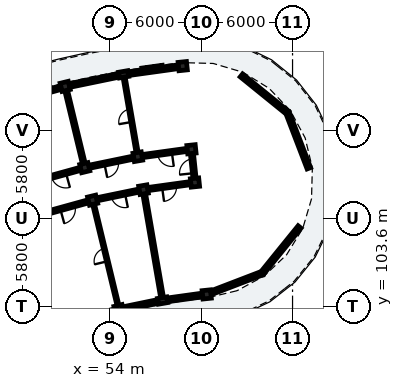
"""IFC4 building model, lengths in metres.
Left out: names, types, materials, properties, quantities, classifications, styles, units other than length and angle.
Written with IfcOpenShell. Run it as: python <this file> out.ifc"""

import sys

from ifc_helpers import new_model, si_unit, direction, frame, frame_2d, origin, origin_2d, place, context, subcontext, project, spatial, rectangle, extrude, element, fill, save


model = new_model("IFC4")
c1 = context("Model", 3, precision=1e-05, world=origin(), true_north=direction((0.0, 1.0)))
c2 = subcontext(c1, "Body", "Model", "MODEL_VIEW")
j1 = project(units=[si_unit("LENGTHUNIT", "METRE"), si_unit("PLANEANGLEUNIT", "RADIAN")], contexts=[c1])
p1 = place(None, origin())
s1 = spatial("IfcSite", under=j1, at=p1, CompositionType="ELEMENT")
p2 = place(p1, origin())
s2 = spatial("IfcBuilding", under=s1, at=p2, CompositionType="ELEMENT")
p3 = place(p2, frame((0.0, 0.0, 22.28)))
s3 = spatial("IfcBuildingStorey", under=s2, at=p3, CompositionType="ELEMENT", Elevation=22.28)
for number, where, z_axis, x_axis in (
    (1, (60.354, 104.406, 0.0), (0.0, 0.0, 1.0), (-0.105, 0.995, 0.0)),
    (2, (59.58, 111.766, 0.0), (0.0, 0.0, 1.0), (-0.105, 0.995, 0.0)),
    (3, (59.35, 113.954, 0.0), (0.0, 0.0, 1.0), (-0.105, 0.995, 0.0)),
    (4, (58.775, 119.424, 0.0), (0.0, 0.0, 1.0), (-0.105, 0.995, 0.0)),
):
    element("IfcColumn", number, at=place(p3, frame(where, z_axis=z_axis, x_axis=x_axis)), inside=s3, PredefinedType="COLUMN", context=c2, shape_type="SweptSolid", body=[
        extrude(rectangle(XDim=0.55, YDim=0.55, at=origin_2d()), origin(), (0.0, 0.0, 1.0), 3.11),
    ])
p4 = place(p3, frame((57.451, 104.004, 0.0), z_axis=(0.0, 0.0, 1.0), x_axis=(-0.169827298811, 0.985473839622, 0.0)))
e5 = element("IfcColumn", 5, at=p4, inside=s3, PredefinedType="PILASTER", context=c2, shape_type="SweptSolid", body=[
    extrude(rectangle(XDim=0.38, YDim=0.62, at=origin_2d()), origin(), (0.0, 0.0, 1.0), 3.11),
])
for number, where, z_axis, x_axis in (
    (6, (56.194, 111.297, 0.0), (0.0, 0.0, 1.0), (-0.17, 0.985, 0.0)),
    (7, (55.821, 113.465, 0.0), (0.0, 0.0, 1.0), (-0.17, 0.985, 0.0)),
):
    element("IfcColumn", number, at=place(p3, frame(where, z_axis=z_axis, x_axis=x_axis)), inside=s3, PredefinedType="COLUMN", context=c2, shape_type="SweptSolid", body=[
        extrude(rectangle(XDim=0.55, YDim=0.55, at=origin_2d()), origin(), (0.0, 0.0, 1.0), 3.11),
    ])
p5 = place(p3, frame((54.887, 118.885, 0.0), z_axis=(0.0, 0.0, 1.0), x_axis=(-0.169827298811, 0.985473839622, 0.0)))
e8 = element("IfcColumn", 8, at=p5, inside=s3, PredefinedType="PILASTER", context=c2, shape_type="SweptSolid", body=[
    extrude(rectangle(XDim=0.38, YDim=0.62, at=origin_2d()), origin(), (0.0, 0.0, 1.0), 3.11),
])
for number, where, z_axis, x_axis in (
    (9, (54.582, 103.412, 0.0), (0.0, 0.0, 1.0), (-0.234, 0.972, 0.0)),
    (10, (52.847, 110.606, 0.0), (0.0, 0.0, 1.0), (-0.234, 0.972, 0.0)),
    (11, (52.331, 112.744, 0.0), (0.0, 0.0, 1.0), (-0.234, 0.972, 0.0)),
    (12, (51.042, 118.091, 0.0), (0.0, 0.0, 1.0), (-0.234, 0.972, 0.0)),
):
    element("IfcColumn", number, at=place(p3, frame(where, z_axis=z_axis, x_axis=x_axis)), inside=s3, PredefinedType="COLUMN", context=c2, shape_type="SweptSolid", body=[
        extrude(rectangle(XDim=0.55, YDim=0.55, at=origin_2d()), origin(), (0.0, 0.0, 1.0), 3.11),
    ])
p6 = place(p3, frame((58.533, 119.39, 0.0), z_axis=(0.0, 0.0, 1.0), x_axis=(-0.990539718913, -0.137226328578, 0.0)))
e13 = element("IfcWall", 13, at=p6, inside=s3, PredefinedType="SOLIDWALL", context=c2, shape_type="SweptSolid", body=[
    extrude(rectangle(XDim=3.521, YDim=0.245, at=frame_2d((1.76, 0.0))), origin(), (0.0, 0.0, 1.0), 2.355),
])
p7 = place(p6, frame((1.035, 0.0, 0.35)))
e14 = element("IfcOpeningElement", 14, at=p7, cuts=e13, PredefinedType="OPENING", context=c2, shape_type="SweptSolid", body=[
    extrude(rectangle(XDim=1.45, YDim=1.7, at=frame_2d((0.725, 0.85))), frame((0.0, 0.133, 0.0), z_axis=(0.0, -1.0, 0.0), x_axis=(1.0, 0.0, 0.0)), (0.0, 0.0, 1.0), 0.265),
])
p8 = place(p3, frame((60.111, 104.373, 0.0), z_axis=(0.0, 0.0, 1.0), x_axis=(-0.990545622952, -0.13718370476, 0.0)))
e15 = element("IfcWall", 15, at=p8, inside=s3, PredefinedType="SOLIDWALL", context=c2, shape_type="SweptSolid", body=[
    extrude(rectangle(XDim=2.525, YDim=0.245, at=frame_2d((1.263, 0.0))), origin(), (0.0, 0.0, 1.0), 2.355),
])
p9 = place(p8, frame((0.363, 0.0, 0.35)))
e16 = element("IfcOpeningElement", 16, at=p9, cuts=e15, PredefinedType="OPENING", context=c2, shape_type="SweptSolid", body=[
    extrude(rectangle(XDim=1.8, YDim=1.85, at=frame_2d((0.9, 0.925))), frame((0.0, 0.133, 0.0), z_axis=(0.0, -1.0, 0.0), x_axis=(1.0, 0.0, 0.0)), (0.0, 0.0, 1.0), 0.265),
])
p10 = place(p3, frame((54.73, 118.853, 0.0), z_axis=(0.0, 0.0, 1.0), x_axis=(-0.979340051053, -0.202220336275, 0.0)))
e17 = element("IfcWall", 17, at=p10, inside=s3, PredefinedType="SOLIDWALL", context=c2, shape_type="SweptSolid", body=[
    extrude(rectangle(XDim=3.521, YDim=0.245, at=frame_2d((1.76, 0.0))), origin(), (0.0, 0.0, 1.0), 2.355),
])
p11 = place(p10, frame((0.96, 0.0, 0.35)))
e18 = element("IfcOpeningElement", 18, at=p11, cuts=e17, PredefinedType="OPENING", context=c2, shape_type="SweptSolid", body=[
    extrude(rectangle(XDim=1.6, YDim=1.75, at=frame_2d((0.8, 0.875))), frame((0.0, 0.133, 0.0), z_axis=(0.0, -1.0, 0.0), x_axis=(1.0, 0.0, 0.0)), (0.0, 0.0, 1.0), 0.265),
])
p12 = place(p3, frame((57.294, 103.972, 0.0), z_axis=(0.0, 0.0, 1.0), x_axis=(-0.979334432394, -0.20224754517, 0.0)))
e19 = element("IfcWall", 19, at=p12, inside=s3, PredefinedType="SOLIDWALL", context=c2, shape_type="SweptSolid", body=[
    extrude(rectangle(XDim=2.525, YDim=0.245, at=frame_2d((1.263, 0.0))), origin(), (0.0, 0.0, 1.0), 2.355),
])
p13 = place(p12, frame((0.623, 0.0, 0.55)))
e20 = element("IfcOpeningElement", 20, at=p13, cuts=e19, PredefinedType="OPENING", context=c2, shape_type="SweptSolid", body=[
    extrude(rectangle(XDim=1.28, YDim=1.52, at=frame_2d((0.64, 0.76))), frame((0.0, 0.133, 0.0), z_axis=(0.0, -1.0, 0.0), x_axis=(1.0, 0.0, 0.0)), (0.0, 0.0, 1.0), 0.265),
])
p14 = place(p3, frame((50.806, 118.026, 0.0), z_axis=(0.0, 0.0, 1.0), x_axis=(-0.963899390209, -0.266266718826, 0.0)))
e21 = element("IfcWall", 21, at=p14, inside=s3, PredefinedType="SOLIDWALL", context=c2, shape_type="SweptSolid", body=[
    extrude(rectangle(XDim=3.521, YDim=0.245, at=frame_2d((1.76, 0.0))), origin(), (0.0, 0.0, 1.0), 2.355),
])
p15 = place(p14, frame((1.22, 0.0, 0.0)))
e22 = element("IfcOpeningElement", 22, at=p15, cuts=e21, PredefinedType="OPENING", context=c2, shape_type="SweptSolid", body=[
    extrude(rectangle(XDim=1.08, YDim=2.15, at=frame_2d((0.54, 1.075))), frame((0.0, 0.133, 0.0), z_axis=(0.0, -1.0, 0.0), x_axis=(1.0, 0.0, 0.0)), (0.0, 0.0, 1.0), 0.265),
])
p16 = place(p3, frame((62.635, 118.812, 0.0), z_axis=(0.0, 0.0, 1.0), x_axis=(0.777137204109, -0.629331205321, 0.0)))
e23 = element("IfcWall", 23, at=p16, inside=s3, PredefinedType="SOLIDWALL", context=c2, shape_type="SweptSolid", body=[
    extrude(rectangle(XDim=3.908, YDim=0.245, at=frame_2d((1.954, 0.0))), origin(), (0.0, 0.0, 1.0), 2.355),
])
p17 = place(p16, frame((0.979, 0.0, 0.4)))
e24 = element("IfcOpeningElement", 24, at=p17, cuts=e23, PredefinedType="OPENING", context=c2, shape_type="SweptSolid", body=[
    extrude(rectangle(XDim=1.95, YDim=1.78, at=frame_2d((0.975, 0.89))), frame((0.0, 0.133, 0.0), z_axis=(0.0, -1.0, 0.0), x_axis=(1.0, 0.0, 0.0)), (0.0, 0.0, 1.0), 0.265),
])
p18 = place(p3, frame((65.673, 116.353, 0.0), z_axis=(0.0, 0.0, 1.0), x_axis=(0.358376224971, -0.933577249817, 0.0)))
e25 = element("IfcWall", 25, at=p18, inside=s3, PredefinedType="SOLIDWALL", context=c2, shape_type="SweptSolid", body=[
    extrude(rectangle(XDim=3.908, YDim=0.245, at=frame_2d((1.954, 0.0))), origin(), (0.0, 0.0, 1.0), 2.355),
])
p19 = place(p3, frame((66.462, 108.844, 0.0), z_axis=(0.0, 0.0, 1.0), x_axis=(-0.629331205321, -0.777137204109, 0.0)))
e26 = element("IfcWall", 26, at=p19, inside=s3, PredefinedType="SOLIDWALL", context=c2, shape_type="SweptSolid", body=[
    extrude(rectangle(XDim=3.908, YDim=0.245, at=frame_2d((1.954, 0.0))), origin(), (0.0, 0.0, 1.0), 2.355),
])
p20 = place(p19, frame((0.979, 0.0, 0.4)))
e27 = element("IfcOpeningElement", 27, at=p20, cuts=e26, PredefinedType="OPENING", context=c2, shape_type="SweptSolid", body=[
    extrude(rectangle(XDim=1.95, YDim=1.78, at=frame_2d((0.975, 0.89))), frame((0.0, 0.133, 0.0), z_axis=(0.0, -1.0, 0.0), x_axis=(1.0, 0.0, 0.0)), (0.0, 0.0, 1.0), 0.265),
])
p21 = place(p3, frame((64.002, 105.807, 0.0), z_axis=(0.0, 0.0, 1.0), x_axis=(-0.93356922619, -0.35839712598, 0.0)))
e28 = element("IfcWall", 28, at=p21, inside=s3, PredefinedType="SOLIDWALL", context=c2, shape_type="SweptSolid", body=[
    extrude(rectangle(XDim=3.908, YDim=0.245, at=frame_2d((1.954, 0.0))), origin(), (0.0, 0.0, 1.0), 2.355),
])
p22 = place(p3, frame((59.004, 113.906, 0.0), z_axis=(0.0, 0.0, 1.0), x_axis=(-0.990544162976, -0.137194246211, 0.0)))
e29 = element("IfcWall", 29, at=p22, inside=s3, PredefinedType="PARTITIONING", context=c2, shape_type="SweptSolid", body=[
    extrude(rectangle(XDim=2.863, YDim=0.205, at=frame_2d((1.432, 0.0))), origin(), (0.0, 0.0, 1.0), 2.37),
])
p23 = place(p22, frame((0.957, 0.0, 0.0)))
e30 = element("IfcOpeningElement", 30, at=p23, cuts=e29, PredefinedType="OPENING", context=c2, shape_type="SweptSolid", body=[
    extrude(rectangle(XDim=0.95, YDim=2.13, at=frame_2d((0.475, 1.065))), frame((0.0, 0.113, 0.0), z_axis=(0.0, -1.0, 0.0), x_axis=(1.0, 0.0, 0.0)), (0.0, 0.0, 1.0), 0.225),
])
p24 = place(p3, frame((59.233, 111.718, 0.0), z_axis=(0.0, 0.0, 1.0), x_axis=(-0.990535404475, -0.137257467855, 0.0)))
e31 = element("IfcWall", 31, at=p24, inside=s3, PredefinedType="PARTITIONING", context=c2, shape_type="SweptSolid", body=[
    extrude(rectangle(XDim=2.718, YDim=0.205, at=frame_2d((1.359, 0.0))), origin(), (0.0, 0.0, 1.0), 2.37),
])
p25 = place(p24, frame((0.884, 0.0, 0.0)))
e32 = element("IfcOpeningElement", 32, at=p25, cuts=e31, PredefinedType="OPENING", context=c2, shape_type="SweptSolid", body=[
    extrude(rectangle(XDim=0.95, YDim=2.13, at=frame_2d((0.475, 1.065))), frame((0.0, 0.113, 0.0), z_axis=(0.0, -1.0, 0.0), x_axis=(1.0, 0.0, 0.0)), (0.0, 0.0, 1.0), 0.225),
])
p26 = place(p3, frame((55.753, 113.859, 0.0), z_axis=(0.0, 0.0, 1.0), x_axis=(-0.169812980219, 0.985476307046, 0.0)))
e33 = element("IfcWall", 33, at=p26, inside=s3, PredefinedType="PLUMBINGWALL", context=c2, shape_type="SweptSolid", body=[
    extrude(rectangle(XDim=4.7, YDim=0.14, at=frame_2d((2.35, 0.0))), origin(), (0.0, 0.0, 1.0), 2.37),
])
p27 = place(p26, frame((1.92, 0.0, 0.0)))
e34 = element("IfcOpeningElement", 34, at=p27, cuts=e33, PredefinedType="OPENING", context=c2, shape_type="SweptSolid", body=[
    extrude(rectangle(XDim=0.86, YDim=2.06, at=frame_2d((0.43, 1.03))), frame((0.0, 0.08, 0.0), z_axis=(0.0, -1.0, 0.0), x_axis=(1.0, 0.0, 0.0)), (0.0, 0.0, 1.0), 0.16),
])
p28 = place(p3, frame((57.383, 104.398, 0.0), z_axis=(0.0, 0.0, 1.0), x_axis=(-0.169825160084, 0.985474208187, 0.0)))
e35 = element("IfcWall", 35, at=p28, inside=s3, PredefinedType="PARTITIONING", context=c2, shape_type="SweptSolid", body=[
    extrude(rectangle(XDim=6.6, YDim=0.185, at=frame_2d((3.3, 0.0))), origin(), (0.0, 0.0, 1.0), 2.37),
])
p29 = place(p3, frame((55.478, 113.394, 0.0), z_axis=(0.0, 0.0, 1.0), x_axis=(-0.979348418612, -0.202179808492, 0.0)))
e36 = element("IfcWall", 36, at=p29, inside=s3, PredefinedType="PARTITIONING", context=c2, shape_type="SweptSolid", body=[
    extrude(rectangle(XDim=2.863, YDim=0.205, at=frame_2d((1.432, 0.0))), origin(), (0.0, 0.0, 1.0), 2.37),
])
p30 = place(p29, frame((0.967, 0.0, 0.0)))
e37 = element("IfcOpeningElement", 37, at=p30, cuts=e36, PredefinedType="OPENING", context=c2, shape_type="SweptSolid", body=[
    extrude(rectangle(XDim=0.93, YDim=2.12, at=frame_2d((0.465, 1.06))), frame((0.0, 0.113, 0.0), z_axis=(0.0, -1.0, 0.0), x_axis=(1.0, 0.0, 0.0)), (0.0, 0.0, 1.0), 0.225),
])
p31 = place(p3, frame((55.852, 111.226, 0.0), z_axis=(0.0, 0.0, 1.0), x_axis=(-0.979349423541, -0.202174940608, 0.0)))
e38 = element("IfcWall", 38, at=p31, inside=s3, PredefinedType="PARTITIONING", context=c2, shape_type="SweptSolid", body=[
    extrude(rectangle(XDim=2.718, YDim=0.205, at=frame_2d((1.359, 0.0))), origin(), (0.0, 0.0, 1.0), 2.37),
])
p32 = place(p31, frame((0.894, 0.0, 0.0)))
e39 = element("IfcOpeningElement", 39, at=p32, cuts=e38, PredefinedType="OPENING", context=c2, shape_type="SweptSolid", body=[
    extrude(rectangle(XDim=0.93, YDim=2.12, at=frame_2d((0.465, 1.06))), frame((0.0, 0.113, 0.0), z_axis=(0.0, -1.0, 0.0), x_axis=(1.0, 0.0, 0.0)), (0.0, 0.0, 1.0), 0.225),
])
p33 = place(p3, frame((52.238, 113.133, 0.0), z_axis=(0.0, 0.0, 1.0), x_axis=(-0.234386624934, 0.972143461662, 0.0)))
e40 = element("IfcWall", 40, at=p33, inside=s3, PredefinedType="PARTITIONING", context=c2, shape_type="SweptSolid", body=[
    extrude(rectangle(XDim=4.7, YDim=0.185, at=frame_2d((2.35, 0.0))), origin(), (0.0, 0.0, 1.0), 2.37),
])
p34 = place(p3, frame((54.488, 103.801, 0.0), z_axis=(0.0, 0.0, 1.0), x_axis=(-0.234406698576, 0.972138621629, 0.0)))
e41 = element("IfcWall", 41, at=p34, inside=s3, PredefinedType="PARTITIONING", context=c2, shape_type="SweptSolid", body=[
    extrude(rectangle(XDim=6.6, YDim=0.125, at=frame_2d((3.3, 0.0))), origin(), (0.0, 0.0, 1.0), 2.37),
])
p35 = place(p34, frame((2.865, 0.0, 0.0)))
e42 = element("IfcOpeningElement", 42, at=p35, cuts=e41, PredefinedType="OPENING", context=c2, shape_type="SweptSolid", body=[
    extrude(rectangle(XDim=0.87, YDim=2.08, at=frame_2d((0.435, 1.04))), frame((0.0, 0.073, 0.0), z_axis=(0.0, -1.0, 0.0), x_axis=(1.0, 0.0, 0.0)), (0.0, 0.0, 1.0), 0.145),
])
p36 = place(p3, frame((51.994, 112.651, 0.0), z_axis=(0.0, 0.0, 1.0), x_axis=(-0.963890789093, -0.266297853356, 0.0)))
e43 = element("IfcWall", 43, at=p36, inside=s3, PredefinedType="PARTITIONING", context=c2, shape_type="SweptSolid", body=[
    extrude(rectangle(XDim=2.863, YDim=0.205, at=frame_2d((1.432, 0.0))), origin(), (0.0, 0.0, 1.0), 2.37),
])
p37 = place(p36, frame((0.937, 0.0, 0.0)))
e44 = element("IfcOpeningElement", 44, at=p37, cuts=e43, PredefinedType="OPENING", context=c2, shape_type="SweptSolid", body=[
    extrude(rectangle(XDim=0.99, YDim=2.16, at=frame_2d((0.495, 1.08))), frame((0.0, 0.113, 0.0), z_axis=(0.0, -1.0, 0.0), x_axis=(1.0, 0.0, 0.0)), (0.0, 0.0, 1.0), 0.225),
])
p38 = place(p3, frame((52.51, 110.512, 0.0), z_axis=(0.0, 0.0, 1.0), x_axis=(-0.96388375821, -0.266323301006, 0.0)))
e45 = element("IfcWall", 45, at=p38, inside=s3, PredefinedType="PARTITIONING", context=c2, shape_type="SweptSolid", body=[
    extrude(rectangle(XDim=2.718, YDim=0.205, at=frame_2d((1.359, 0.0))), origin(), (0.0, 0.0, 1.0), 2.37),
])
p39 = place(p38, frame((0.864, 0.0, 0.0)))
e46 = element("IfcOpeningElement", 46, at=p39, cuts=e45, PredefinedType="OPENING", context=c2, shape_type="SweptSolid", body=[
    extrude(rectangle(XDim=0.99, YDim=2.16, at=frame_2d((0.495, 1.08))), frame((0.0, 0.113, 0.0), z_axis=(0.0, -1.0, 0.0), x_axis=(1.0, 0.0, 0.0)), (0.0, 0.0, 1.0), 0.225),
])
p40 = place(p3, frame((59.575, 111.816, 0.0), z_axis=(0.0, 0.0, 1.0), x_axis=(-0.104509292252, 0.994523910136, 0.0)))
e47 = element("IfcWall", 47, at=p40, inside=s3, PredefinedType="PARTITIONING", context=c2, shape_type="SweptSolid", body=[
    extrude(rectangle(XDim=2.1, YDim=0.205, at=frame_2d((1.05, 0.0))), origin(), (0.0, 0.0, 1.0), 2.37),
])
p41 = place(p40, frame((0.57, 0.0, 0.0)))
e48 = element("IfcOpeningElement", 48, at=p41, cuts=e47, PredefinedType="OPENING", context=c2, shape_type="SweptSolid", body=[
    extrude(rectangle(XDim=0.95, YDim=2.13, at=frame_2d((0.475, 1.065))), frame((0.0, 0.113, 0.0), z_axis=(0.0, -1.0, 0.0), x_axis=(1.0, 0.0, 0.0)), (0.0, 0.0, 1.0), 0.225),
])
p42 = place(p7, origin())
e49 = element("IfcWindow", 49, at=p42, inside=s3, PartitioningType="SINGLE_PANEL", PredefinedType="WINDOW", context=c2, shape_type="SweptSolid", body=[
    extrude(rectangle(XDim=1.45, YDim=1.7, at=frame_2d((0.725, 0.85))), frame((0.0, 0.03, 0.0), z_axis=(0.0, -1.0, 0.0), x_axis=(1.0, 0.0, 0.0)), (0.0, 0.0, 1.0), 0.06),
])
fill(e14, e49)
p43 = place(p9, origin())
e50 = element("IfcWindow", 50, at=p43, inside=s3, PartitioningType="SINGLE_PANEL", PredefinedType="WINDOW", context=c2, shape_type="SweptSolid", body=[
    extrude(rectangle(XDim=1.8, YDim=1.85, at=frame_2d((0.9, 0.925))), frame((0.0, 0.03, 0.0), z_axis=(0.0, -1.0, 0.0), x_axis=(1.0, 0.0, 0.0)), (0.0, 0.0, 1.0), 0.06),
])
fill(e16, e50)
p44 = place(p11, origin())
e51 = element("IfcWindow", 51, at=p44, inside=s3, PartitioningType="SINGLE_PANEL", PredefinedType="WINDOW", context=c2, shape_type="SweptSolid", body=[
    extrude(rectangle(XDim=1.6, YDim=1.75, at=frame_2d((0.8, 0.875))), frame((0.0, 0.03, 0.0), z_axis=(0.0, -1.0, 0.0), x_axis=(1.0, 0.0, 0.0)), (0.0, 0.0, 1.0), 0.06),
])
fill(e18, e51)
p45 = place(p13, origin())
e52 = element("IfcWindow", 52, at=p45, inside=s3, PartitioningType="SINGLE_PANEL", PredefinedType="WINDOW", context=c2, shape_type="SweptSolid", body=[
    extrude(rectangle(XDim=1.28, YDim=1.52, at=frame_2d((0.64, 0.76))), frame((0.0, 0.03, 0.0), z_axis=(0.0, -1.0, 0.0), x_axis=(1.0, 0.0, 0.0)), (0.0, 0.0, 1.0), 0.06),
])
fill(e20, e52)
p46 = place(p17, origin())
e53 = element("IfcWindow", 53, at=p46, inside=s3, PartitioningType="SINGLE_PANEL", PredefinedType="WINDOW", context=c2, shape_type="SweptSolid", body=[
    extrude(rectangle(XDim=1.95, YDim=1.78, at=frame_2d((0.975, 0.89))), frame((0.0, 0.03, 0.0), z_axis=(0.0, -1.0, 0.0), x_axis=(1.0, 0.0, 0.0)), (0.0, 0.0, 1.0), 0.06),
])
fill(e24, e53)
p47 = place(p20, origin())
e54 = element("IfcWindow", 54, at=p47, inside=s3, PartitioningType="SINGLE_PANEL", PredefinedType="WINDOW", context=c2, shape_type="SweptSolid", body=[
    extrude(rectangle(XDim=1.95, YDim=1.78, at=frame_2d((0.975, 0.89))), frame((0.0, 0.03, 0.0), z_axis=(0.0, -1.0, 0.0), x_axis=(1.0, 0.0, 0.0)), (0.0, 0.0, 1.0), 0.06),
])
fill(e27, e54)
p48 = place(p23, origin())
e55 = element("IfcDoor", 55, at=p48, inside=s3, OperationType="SINGLE_SWING_LEFT", PredefinedType="DOOR", context=c2, shape_type="SweptSolid", body=[
    extrude(rectangle(XDim=0.95, YDim=2.13, at=frame_2d((0.475, 1.065))), frame((0.0, 0.025, 0.0), z_axis=(0.0, -1.0, 0.0), x_axis=(1.0, 0.0, 0.0)), (0.0, 0.0, 1.0), 0.05),
])
fill(e30, e55)
p49 = place(p25, origin())
e56 = element("IfcDoor", 56, at=p49, inside=s3, OperationType="SINGLE_SWING_RIGHT", PredefinedType="DOOR", context=c2, shape_type="SweptSolid", body=[
    extrude(rectangle(XDim=0.95, YDim=2.13, at=frame_2d((0.475, 1.065))), frame((0.0, 0.025, 0.0), z_axis=(0.0, -1.0, 0.0), x_axis=(1.0, 0.0, 0.0)), (0.0, 0.0, 1.0), 0.05),
])
fill(e32, e56)
p50 = place(p27, origin())
e57 = element("IfcDoor", 57, at=p50, inside=s3, OperationType="SINGLE_SWING_LEFT", PredefinedType="DOOR", context=c2, shape_type="SweptSolid", body=[
    extrude(rectangle(XDim=0.86, YDim=2.06, at=frame_2d((0.43, 1.03))), frame((0.0, 0.025, 0.0), z_axis=(0.0, -1.0, 0.0), x_axis=(1.0, 0.0, 0.0)), (0.0, 0.0, 1.0), 0.05),
])
fill(e34, e57)
p51 = place(p30, origin())
e58 = element("IfcDoor", 58, at=p51, inside=s3, OperationType="SINGLE_SWING_RIGHT", PredefinedType="DOOR", context=c2, shape_type="SweptSolid", body=[
    extrude(rectangle(XDim=0.93, YDim=2.12, at=frame_2d((0.465, 1.06))), frame((0.0, 0.025, 0.0), z_axis=(0.0, -1.0, 0.0), x_axis=(1.0, 0.0, 0.0)), (0.0, 0.0, 1.0), 0.05),
])
fill(e37, e58)
p52 = place(p32, origin())
e59 = element("IfcDoor", 59, at=p52, inside=s3, OperationType="SINGLE_SWING_LEFT", PredefinedType="DOOR", context=c2, shape_type="SweptSolid", body=[
    extrude(rectangle(XDim=0.93, YDim=2.12, at=frame_2d((0.465, 1.06))), frame((0.0, 0.025, 0.0), z_axis=(0.0, -1.0, 0.0), x_axis=(1.0, 0.0, 0.0)), (0.0, 0.0, 1.0), 0.05),
])
fill(e39, e59)
p53 = place(p35, origin())
e60 = element("IfcDoor", 60, at=p53, inside=s3, OperationType="SINGLE_SWING_LEFT", PredefinedType="DOOR", context=c2, shape_type="SweptSolid", body=[
    extrude(rectangle(XDim=0.87, YDim=2.08, at=frame_2d((0.435, 1.04))), frame((0.0, 0.025, 0.0), z_axis=(0.0, -1.0, 0.0), x_axis=(1.0, 0.0, 0.0)), (0.0, 0.0, 1.0), 0.05),
])
fill(e42, e60)
p54 = place(p37, origin())
e61 = element("IfcDoor", 61, at=p54, inside=s3, OperationType="SINGLE_SWING_LEFT", PredefinedType="DOOR", context=c2, shape_type="SweptSolid", body=[
    extrude(rectangle(XDim=0.99, YDim=2.16, at=frame_2d((0.495, 1.08))), frame((0.0, 0.025, 0.0), z_axis=(0.0, -1.0, 0.0), x_axis=(1.0, 0.0, 0.0)), (0.0, 0.0, 1.0), 0.05),
])
fill(e44, e61)
p55 = place(p39, origin())
e62 = element("IfcDoor", 62, at=p55, inside=s3, OperationType="SINGLE_SWING_RIGHT", PredefinedType="DOOR", context=c2, shape_type="SweptSolid", body=[
    extrude(rectangle(XDim=0.99, YDim=2.16, at=frame_2d((0.495, 1.08))), frame((0.0, 0.025, 0.0), z_axis=(0.0, -1.0, 0.0), x_axis=(1.0, 0.0, 0.0)), (0.0, 0.0, 1.0), 0.05),
])
fill(e46, e62)
p56 = place(p41, origin())
e63 = element("IfcDoor", 63, at=p56, inside=s3, OperationType="SINGLE_SWING_LEFT", PredefinedType="DOOR", context=c2, shape_type="SweptSolid", body=[
    extrude(rectangle(XDim=0.95, YDim=2.13, at=frame_2d((0.475, 1.065))), frame((0.0, 0.025, 0.0), z_axis=(0.0, -1.0, 0.0), x_axis=(1.0, 0.0, 0.0)), (0.0, 0.0, 1.0), 0.05),
])
fill(e48, e63)
save(model, sys.argv[1])
